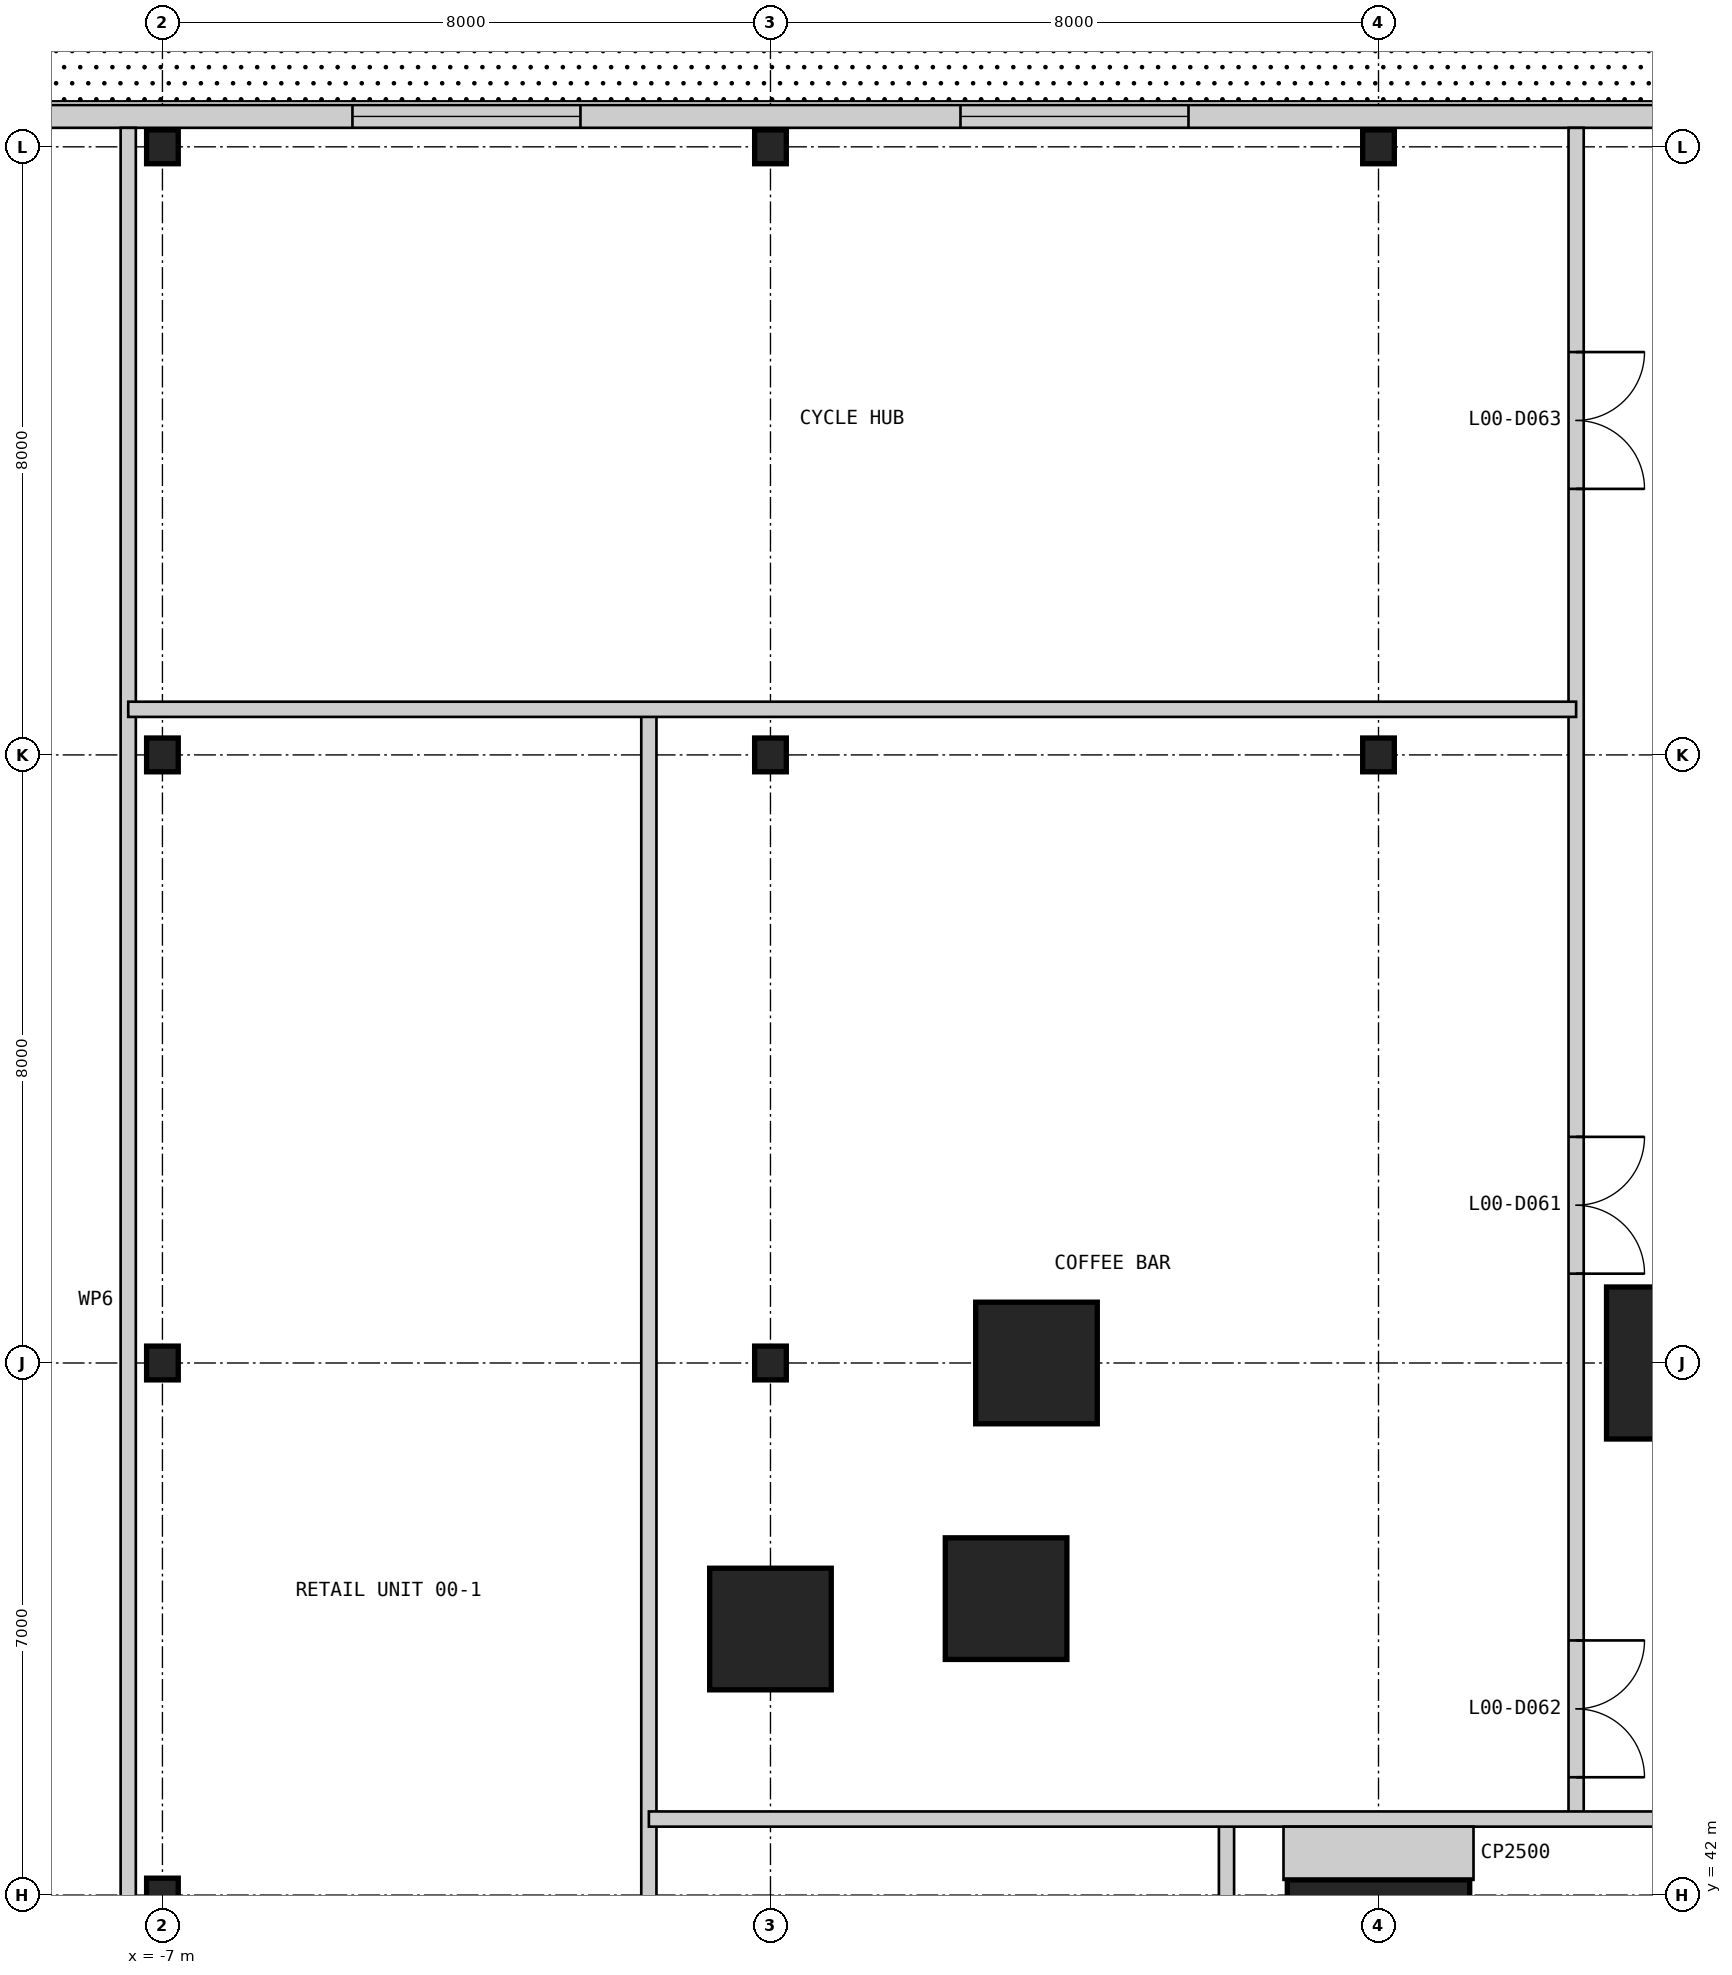
"""IFC4 building model, lengths in metres.
Left out: names, types, materials, properties, quantities, classifications, styles, units other than length and angle.
Written with IfcOpenShell. Run it as: python <this file> out.ifc"""

import sys

from ifc_helpers import new_model, si_unit, direction, frame, frame_2d, origin, origin_2d, place, context, subcontext, project, spatial, rectangle, i_section, extrude, element, fill, save


model = new_model("IFC4")
c1 = context("Model", 3, precision=1e-05, world=origin(), true_north=direction((0.0, 1.0)))
c2 = subcontext(c1, "Body", "Model", "MODEL_VIEW")
j1 = project(units=[si_unit("LENGTHUNIT", "METRE"), si_unit("PLANEANGLEUNIT", "RADIAN")], contexts=[c1])
p1 = place(None, origin())
s1 = spatial("IfcSite", under=j1, at=p1, CompositionType="ELEMENT")
p2 = place(p1, origin())
s2 = spatial("IfcBuilding", under=s1, at=p2, CompositionType="ELEMENT")
p3 = place(p2, origin())
s3 = spatial("IfcBuildingStorey", under=s2, at=p3, CompositionType="ELEMENT", Elevation=0.0)
p4 = place(p3, frame((9.0, 41.0, 0.0), z_axis=(0.0, 0.0, 1.0), x_axis=(1.0, 0.0, 0.0)))
e1 = element("IfcColumn", 1, at=p4, inside=s3, PredefinedType="COLUMN", context=c2, shape_type="SweptSolid", body=[
    extrude(rectangle(XDim=2.4, YDim=2.4, at=origin_2d()), origin(), (0.0, 0.0, 1.0), 7.0),
])
p5 = place(p3, frame((13.0, 49.0, 0.0), z_axis=(0.0, 0.0, 1.0), x_axis=(1.0, 0.0, 0.0)))
e2 = element("IfcColumn", 2, at=p5, inside=s3, PredefinedType="COLUMN", context=c2, shape_type="SweptSolid", body=[
    extrude(rectangle(XDim=2.0, YDim=2.0, at=origin_2d()), origin(), (0.0, 0.0, 1.0), 7.0),
])
for number, where, z_axis, x_axis in (
    (3, (4.5, 49.0, 0.0), (0.0, 0.0, 1.0), (1.0, 0.0, 0.0)),
    (4, (4.1, 45.9, 0.0), (0.0, 0.0, 1.0), (1.0, 0.0, 0.0)),
    (5, (1.0, 45.5, 0.0), (0.0, 0.0, 1.0), (1.0, 0.0, 0.0)),
):
    element("IfcColumn", number, at=place(p3, frame(where, z_axis=z_axis, x_axis=x_axis)), inside=s3, PredefinedType="COLUMN", context=c2, shape_type="SweptSolid", body=[
        extrude(rectangle(XDim=1.6, YDim=1.6, at=origin_2d()), origin(), (0.0, 0.0, 1.0), 7.0),
    ])
for number, where, z_axis, x_axis in (
    (6, (-7.0, 42.0, 0.0), (0.0, 0.0, 1.0), (1.0, 0.0, 0.0)),
    (7, (-7.0, 49.0, 0.0), (0.0, 0.0, 1.0), (1.0, 0.0, 0.0)),
    (8, (-7.0, 57.0, 0.0), (0.0, 0.0, 1.0), (1.0, 0.0, 0.0)),
):
    element("IfcColumn", number, at=place(p3, frame(where, z_axis=z_axis, x_axis=x_axis)), inside=s3, PredefinedType="COLUMN", context=c2, shape_type="SweptSolid", body=[
        extrude(i_section(OverallWidth=0.417, OverallDepth=0.445, WebThickness=0.039, FlangeThickness=0.063, at=origin_2d()), origin(), (0.0, 0.0, 1.0), 7.0),
    ])
p6 = place(p3, frame((-7.0, 65.0, -0.3), z_axis=(0.0, 0.0, 1.0), x_axis=(1.0, 0.0, 0.0)))
e9 = element("IfcColumn", 9, at=p6, inside=s3, PredefinedType="COLUMN", context=c2, shape_type="SweptSolid", body=[
    extrude(i_section(OverallWidth=0.417, OverallDepth=0.445, WebThickness=0.039, FlangeThickness=0.063, at=origin_2d()), origin(), (0.0, 0.0, 1.0), 7.3),
])
for number, where, z_axis, x_axis in (
    (10, (1.0, 49.0, 0.0), (0.0, 0.0, 1.0), (1.0, 0.0, 0.0)),
    (11, (1.0, 57.0, 0.0), (0.0, 0.0, 1.0), (1.0, 0.0, 0.0)),
):
    element("IfcColumn", number, at=place(p3, frame(where, z_axis=z_axis, x_axis=x_axis)), inside=s3, PredefinedType="COLUMN", context=c2, shape_type="SweptSolid", body=[
        extrude(i_section(OverallWidth=0.417, OverallDepth=0.445, WebThickness=0.039, FlangeThickness=0.063, at=origin_2d()), origin(), (0.0, 0.0, 1.0), 7.0),
    ])
p7 = place(p3, frame((1.0, 65.0, -0.3), z_axis=(0.0, 0.0, 1.0), x_axis=(1.0, 0.0, 0.0)))
e12 = element("IfcColumn", 12, at=p7, inside=s3, PredefinedType="COLUMN", context=c2, shape_type="SweptSolid", body=[
    extrude(i_section(OverallWidth=0.417, OverallDepth=0.445, WebThickness=0.039, FlangeThickness=0.063, at=origin_2d()), origin(), (0.0, 0.0, 1.0), 7.3),
])
p8 = place(p3, frame((9.0, 57.0, 0.0), z_axis=(0.0, 0.0, 1.0), x_axis=(1.0, 0.0, 0.0)))
e13 = element("IfcColumn", 13, at=p8, inside=s3, PredefinedType="COLUMN", context=c2, shape_type="SweptSolid", body=[
    extrude(i_section(OverallWidth=0.417, OverallDepth=0.445, WebThickness=0.039, FlangeThickness=0.063, at=origin_2d()), origin(), (0.0, 0.0, 1.0), 7.0),
])
p9 = place(p3, frame((9.0, 65.0, -0.3), z_axis=(0.0, 0.0, 1.0), x_axis=(1.0, 0.0, 0.0)))
e14 = element("IfcColumn", 14, at=p9, inside=s3, PredefinedType="COLUMN", context=c2, shape_type="SweptSolid", body=[
    extrude(i_section(OverallWidth=0.417, OverallDepth=0.445, WebThickness=0.039, FlangeThickness=0.063, at=origin_2d()), origin(), (0.0, 0.0, 1.0), 7.3),
])
p10 = place(p3, frame((65.55, 65.4, 0.0), z_axis=(0.0, 0.0, 1.0), x_axis=(-1.0, 0.0, 0.0)))
e15 = element("IfcWall", 15, at=p10, inside=s3, PredefinedType="SOLIDWALL", context=c2, shape_type="SweptSolid", body=[
    extrude(rectangle(XDim=81.1, YDim=0.3, at=frame_2d((40.55, 0.0))), origin(), (0.0, 0.0, 1.0), 6.7),
])
p11 = place(p10, frame((37.65, 0.0, 0.0)))
e16 = element("IfcOpeningElement", 16, at=p11, cuts=e15, PredefinedType="OPENING", context=c2, shape_type="SweptSolid", body=[
    extrude(rectangle(XDim=1.8, YDim=2.4, at=frame_2d((0.9, 1.2))), frame((0.0, 0.16, 0.0), z_axis=(0.0, -1.0, 0.0), x_axis=(1.0, 0.0, 0.0)), (0.0, 0.0, 1.0), 0.32),
])
p12 = place(p10, frame((33.65, 0.0, 0.0)))
e17 = element("IfcOpeningElement", 17, at=p12, cuts=e15, PredefinedType="OPENING", context=c2, shape_type="SweptSolid", body=[
    extrude(rectangle(XDim=1.8, YDim=2.4, at=frame_2d((0.9, 1.2))), frame((0.0, 0.16, 0.0), z_axis=(0.0, -1.0, 0.0), x_axis=(1.0, 0.0, 0.0)), (0.0, 0.0, 1.0), 0.32),
])
p13 = place(p10, frame((18.25, 0.0, 0.0)))
e18 = element("IfcOpeningElement", 18, at=p13, cuts=e15, PredefinedType="OPENING", context=c2, shape_type="SweptSolid", body=[
    extrude(rectangle(XDim=3.6, YDim=4.5, at=frame_2d((1.8, 2.25))), frame((0.0, 0.16, 0.0), z_axis=(0.0, -1.0, 0.0), x_axis=(1.0, 0.0, 0.0)), (0.0, 0.0, 1.0), 0.32),
])
p14 = place(p10, frame((75.05, 0.0, 0.9)))
e19 = element("IfcOpeningElement", 19, at=p14, cuts=e15, PredefinedType="OPENING", context=c2, shape_type="SweptSolid", body=[
    extrude(rectangle(XDim=3.0, YDim=2.4, at=frame_2d((1.5, 1.2))), frame((0.0, 0.16, 0.0), z_axis=(0.0, -1.0, 0.0), x_axis=(1.0, 0.0, 0.0)), (0.0, 0.0, 1.0), 0.32),
])
p15 = place(p10, frame((67.05, 0.0, 0.9)))
e20 = element("IfcOpeningElement", 20, at=p15, cuts=e15, PredefinedType="OPENING", context=c2, shape_type="SweptSolid", body=[
    extrude(rectangle(XDim=3.0, YDim=2.4, at=frame_2d((1.5, 1.2))), frame((0.0, 0.16, 0.0), z_axis=(0.0, -1.0, 0.0), x_axis=(1.0, 0.0, 0.0)), (0.0, 0.0, 1.0), 0.32),
])
p16 = place(p10, frame((59.05, 0.0, 0.9)))
e21 = element("IfcOpeningElement", 21, at=p16, cuts=e15, PredefinedType="OPENING", context=c2, shape_type="SweptSolid", body=[
    extrude(rectangle(XDim=3.0, YDim=2.4, at=frame_2d((1.5, 1.2))), frame((0.0, 0.16, 0.0), z_axis=(0.0, -1.0, 0.0), x_axis=(1.0, 0.0, 0.0)), (0.0, 0.0, 1.0), 0.32),
])
p17 = place(p10, frame((45.05, 0.0, 0.9)))
e22 = element("IfcOpeningElement", 22, at=p17, cuts=e15, PredefinedType="OPENING", context=c2, shape_type="SweptSolid", body=[
    extrude(rectangle(XDim=3.0, YDim=2.4, at=frame_2d((1.5, 1.2))), frame((0.0, 0.16, 0.0), z_axis=(0.0, -1.0, 0.0), x_axis=(1.0, 0.0, 0.0)), (0.0, 0.0, 1.0), 0.32),
])
p18 = place(p10, frame((24.55, 0.0, 0.9)))
e23 = element("IfcOpeningElement", 23, at=p18, cuts=e15, PredefinedType="OPENING", context=c2, shape_type="SweptSolid", body=[
    extrude(rectangle(XDim=3.0, YDim=2.4, at=frame_2d((1.5, 1.2))), frame((0.0, 0.16, 0.0), z_axis=(0.0, -1.0, 0.0), x_axis=(1.0, 0.0, 0.0)), (0.0, 0.0, 1.0), 0.32),
])
p19 = place(p10, frame((11.05, 0.0, 0.9)))
e24 = element("IfcOpeningElement", 24, at=p19, cuts=e15, PredefinedType="OPENING", context=c2, shape_type="SweptSolid", body=[
    extrude(rectangle(XDim=3.0, YDim=2.4, at=frame_2d((1.5, 1.2))), frame((0.0, 0.16, 0.0), z_axis=(0.0, -1.0, 0.0), x_axis=(1.0, 0.0, 0.0)), (0.0, 0.0, 1.0), 0.32),
])
p20 = place(p10, frame((3.05, 0.0, 0.9)))
e25 = element("IfcOpeningElement", 25, at=p20, cuts=e15, PredefinedType="OPENING", context=c2, shape_type="SweptSolid", body=[
    extrude(rectangle(XDim=3.0, YDim=2.4, at=frame_2d((1.5, 1.2))), frame((0.0, 0.16, 0.0), z_axis=(0.0, -1.0, 0.0), x_axis=(1.0, 0.0, 0.0)), (0.0, 0.0, 1.0), 0.32),
])
p21 = place(p3, frame((-7.45, 34.4, 0.0), z_axis=(0.0, 0.0, 1.0), x_axis=(0.0, 1.0, 0.0)))
e26 = element("IfcWall", 26, at=p21, inside=s3, PredefinedType="PARTITIONING", context=c2, shape_type="SweptSolid", body=[
    extrude(rectangle(XDim=30.85, YDim=0.2, at=frame_2d((15.425, 0.0))), origin(), (0.0, 0.0, 1.0), 6.7),
])
p22 = place(p3, frame((-0.6, 34.4, 0.0), z_axis=(0.0, 0.0, 1.0), x_axis=(0.0, 1.0, 0.0)))
e27 = element("IfcWall", 27, at=p22, inside=s3, PredefinedType="PARTITIONING", context=c2, shape_type="SweptSolid", body=[
    extrude(rectangle(XDim=23.2, YDim=0.2, at=frame_2d((11.6, 0.0))), origin(), (0.0, 0.0, 1.0), 6.7),
])
p23 = place(p3, frame((7.0, 22.0, 0.0), z_axis=(0.0, 0.0, 1.0), x_axis=(0.0, 1.0, 0.0)))
e28 = element("IfcWall", 28, at=p23, inside=s3, PredefinedType="PARTITIONING", context=c2, shape_type="SweptSolid", body=[
    extrude(rectangle(XDim=21.0, YDim=0.2, at=frame_2d((10.5, 0.0))), origin(), (0.0, 0.0, 1.0), 6.043),
])
p24 = place(p23, frame((4.05, 0.0, 0.0)))
e29 = element("IfcOpeningElement", 29, at=p24, cuts=e28, PredefinedType="OPENING", context=c2, shape_type="SweptSolid", body=[
    extrude(rectangle(XDim=1.8, YDim=2.4, at=frame_2d((0.9, 1.2))), frame((0.0, 0.11, 0.0), z_axis=(0.0, -1.0, 0.0), x_axis=(1.0, 0.0, 0.0)), (0.0, 0.0, 1.0), 0.22),
])
p25 = place(p3, frame((11.6, 43.0, 0.0), z_axis=(0.0, 0.0, 1.0), x_axis=(0.0, 1.0, 0.0)))
e30 = element("IfcWall", 30, at=p25, inside=s3, PredefinedType="PARTITIONING", context=c2, shape_type="SweptSolid", body=[
    extrude(rectangle(XDim=22.25, YDim=0.2, at=frame_2d((11.125, 0.0))), origin(), (0.0, 0.0, 1.0), 6.7),
])
p26 = place(p25, frame((7.175, 0.0, 0.0)))
e31 = element("IfcOpeningElement", 31, at=p26, cuts=e30, PredefinedType="OPENING", context=c2, shape_type="SweptSolid", body=[
    extrude(rectangle(XDim=1.8, YDim=2.4, at=frame_2d((0.9, 1.2))), frame((0.0, 0.11, 0.0), z_axis=(0.0, -1.0, 0.0), x_axis=(1.0, 0.0, 0.0)), (0.0, 0.0, 1.0), 0.22),
])
p27 = place(p25, frame((0.55, 0.0, 0.0)))
e32 = element("IfcOpeningElement", 32, at=p27, cuts=e30, PredefinedType="OPENING", context=c2, shape_type="SweptSolid", body=[
    extrude(rectangle(XDim=1.8, YDim=2.4, at=frame_2d((0.9, 1.2))), frame((0.0, 0.11, 0.0), z_axis=(0.0, -1.0, 0.0), x_axis=(1.0, 0.0, 0.0)), (0.0, 0.0, 1.0), 0.22),
])
p28 = place(p25, frame((17.5, 0.0, 0.0)))
e33 = element("IfcOpeningElement", 33, at=p28, cuts=e30, PredefinedType="OPENING", context=c2, shape_type="SweptSolid", body=[
    extrude(rectangle(XDim=1.8, YDim=2.4, at=frame_2d((0.9, 1.2))), frame((0.0, 0.11, 0.0), z_axis=(0.0, -1.0, 0.0), x_axis=(1.0, 0.0, 0.0)), (0.0, 0.0, 1.0), 0.22),
])
p29 = place(p3, frame((-0.6, 43.0, 0.0), z_axis=(0.0, 0.0, 1.0), x_axis=(1.0, 0.0, 0.0)))
e34 = element("IfcWall", 34, at=p29, inside=s3, PredefinedType="PARTITIONING", context=c2, shape_type="SweptSolid", body=[
    extrude(rectangle(XDim=14.6, YDim=0.2, at=frame_2d((7.3, 0.0))), origin(), (0.0, 0.0, 1.0), 6.7),
])
p30 = place(p3, frame((-7.45, 57.6, 0.0), z_axis=(0.0, 0.0, 1.0), x_axis=(1.0, 0.0, 0.0)))
e35 = element("IfcWall", 35, at=p30, inside=s3, PredefinedType="PARTITIONING", context=c2, shape_type="SweptSolid", body=[
    extrude(rectangle(XDim=19.05, YDim=0.2, at=frame_2d((9.525, 0.0))), origin(), (0.0, 0.0, 1.0), 6.7),
])
p31 = place(p3, frame((9.0, 42.9, 0.0), z_axis=(0.0, 0.0, 1.0), x_axis=(0.0, -1.0, 0.0)))
e36 = element("IfcWall", 36, at=p31, inside=s3, PredefinedType="PARTITIONING", context=c2, shape_type="SweptSolid", body=[
    extrude(rectangle(XDim=0.7, YDim=2.5, at=frame_2d((0.35, 0.0))), origin(), (0.0, 0.0, 1.0), 6.7),
])
p32 = place(p15, origin())
e37 = element("IfcWindow", 37, at=p32, inside=s3, PartitioningType="SINGLE_PANEL", PredefinedType="WINDOW", context=c2, shape_type="SweptSolid", body=[
    extrude(rectangle(XDim=3.0, YDim=2.4, at=frame_2d((1.5, 1.2))), frame((0.0, 0.03, 0.0), z_axis=(0.0, -1.0, 0.0), x_axis=(1.0, 0.0, 0.0)), (0.0, 0.0, 1.0), 0.06),
])
fill(e20, e37)
p33 = place(p16, origin())
e38 = element("IfcWindow", 38, at=p33, inside=s3, PartitioningType="SINGLE_PANEL", PredefinedType="WINDOW", context=c2, shape_type="SweptSolid", body=[
    extrude(rectangle(XDim=3.0, YDim=2.4, at=frame_2d((1.5, 1.2))), frame((0.0, 0.03, 0.0), z_axis=(0.0, -1.0, 0.0), x_axis=(1.0, 0.0, 0.0)), (0.0, 0.0, 1.0), 0.06),
])
fill(e21, e38)
p34 = place(p26, frame((1.8, 0.0, 0.0), z_axis=(0.0, 0.0, 1.0), x_axis=(-1.0, 0.0, 0.0)))
e39 = element("IfcDoor", 39, at=p34, inside=s3, OperationType="DOUBLE_DOOR_SINGLE_SWING", PredefinedType="DOOR", context=c2, shape_type="SweptSolid", body=[
    extrude(rectangle(XDim=1.8, YDim=2.4, at=frame_2d((0.9, 1.2))), frame((0.0, 0.025, 0.0), z_axis=(0.0, -1.0, 0.0), x_axis=(1.0, 0.0, 0.0)), (0.0, 0.0, 1.0), 0.05),
])
fill(e31, e39)
p35 = place(p27, frame((1.8, 0.0, 0.0), z_axis=(0.0, 0.0, 1.0), x_axis=(-1.0, 0.0, 0.0)))
e40 = element("IfcDoor", 40, at=p35, inside=s3, OperationType="DOUBLE_DOOR_SINGLE_SWING", PredefinedType="DOOR", context=c2, shape_type="SweptSolid", body=[
    extrude(rectangle(XDim=1.8, YDim=2.4, at=frame_2d((0.9, 1.2))), frame((0.0, 0.025, 0.0), z_axis=(0.0, -1.0, 0.0), x_axis=(1.0, 0.0, 0.0)), (0.0, 0.0, 1.0), 0.05),
])
fill(e32, e40)
p36 = place(p28, frame((1.8, 0.0, 0.0), z_axis=(0.0, 0.0, 1.0), x_axis=(-1.0, 0.0, 0.0)))
e41 = element("IfcDoor", 41, at=p36, inside=s3, OperationType="DOUBLE_DOOR_SINGLE_SWING", PredefinedType="DOOR", context=c2, shape_type="SweptSolid", body=[
    extrude(rectangle(XDim=1.8, YDim=2.4, at=frame_2d((0.9, 1.2))), frame((0.0, 0.025, 0.0), z_axis=(0.0, -1.0, 0.0), x_axis=(1.0, 0.0, 0.0)), (0.0, 0.0, 1.0), 0.05),
])
fill(e33, e41)
save(model, sys.argv[1])
